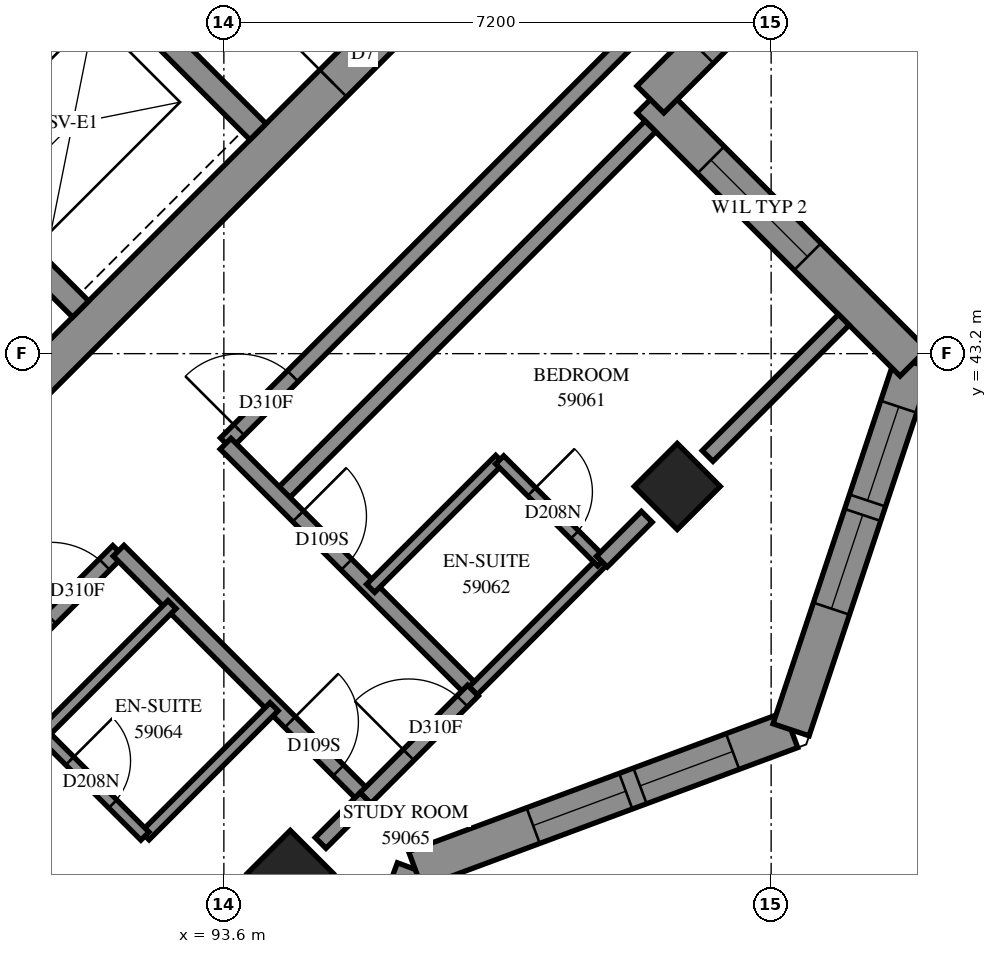
"""IFC4 building model, lengths in metres.
Left out: names, types, materials, properties, quantities, classifications, styles, units other than length and angle.
Written with IfcOpenShell. Run it as: python <this file> out.ifc"""

import sys

from ifc_helpers import new_model, si_unit, direction, frame, frame_2d, origin, origin_2d, place, context, subcontext, project, spatial, polyline, rectangle, outline, extrude, element, fill, save


model = new_model("IFC4")
c1 = context("Model", 3, precision=1e-05, world=origin(), true_north=direction((0.0, 1.0)))
c2 = subcontext(c1, "Body", "Model", "MODEL_VIEW")
j1 = project(units=[si_unit("LENGTHUNIT", "METRE"), si_unit("PLANEANGLEUNIT", "RADIAN")], contexts=[c1])
p1 = place(None, origin())
s1 = spatial("IfcSite", under=j1, at=p1, CompositionType="ELEMENT")
p2 = place(p1, origin())
s2 = spatial("IfcBuilding", under=s1, at=p2, CompositionType="ELEMENT")
p3 = place(p2, frame((0.0, 0.0, 216.8)))
s3 = spatial("IfcBuildingStorey", under=s2, at=p3, CompositionType="ELEMENT", Elevation=216.8)
for number, where, z_axis, x_axis in (
    (1, (99.565, 41.453, 0.0), (0.0, 0.0, 1.0), (0.707, -0.707, 0.0)),
    (2, (94.474, 36.362, 0.0), (0.0, 0.0, 1.0), (0.707, -0.707, 0.0)),
):
    element("IfcColumn", number, at=place(p3, frame(where, z_axis=z_axis, x_axis=x_axis)), inside=s3, PredefinedType="COLUMN", context=c2, shape_type="SweptSolid", body=[
        extrude(rectangle(XDim=0.8, YDim=0.8, at=origin_2d()), origin(), (0.0, 0.0, 1.0), 3.1),
    ])
p4 = place(p3, frame((87.013, 38.731, -0.3), z_axis=(0.0, 0.0, 1.0), x_axis=(0.7071067812, 0.7071067812, 0.0)))
e3 = element("IfcWall", 3, at=p4, inside=s3, PredefinedType="SHEAR", context=c2, shape_type="SweptSolid", body=[
    extrude(rectangle(XDim=14.4, YDim=0.5, at=frame_2d((7.2, 0.0))), origin(), (0.0, 0.0, 1.0), 2.7),
])
p5 = place(p4, frame((4.55, 0.0, 0.3)))
e4 = element("IfcOpeningElement", 4, at=p5, cuts=e3, PredefinedType="OPENING", context=c2, shape_type="SweptSolid", body=[
    extrude(rectangle(XDim=1.1, YDim=2.1, at=frame_2d((0.55, 1.05))), frame((0.0, 0.26, 0.0), z_axis=(0.0, -1.0, 0.0), x_axis=(1.0, 0.0, 0.0)), (0.0, 0.0, 1.0), 0.52),
])
p6 = place(p4, frame((11.35, 0.0, 0.3)))
e5 = element("IfcOpeningElement", 5, at=p6, cuts=e3, PredefinedType="OPENING", context=c2, shape_type="SweptSolid", body=[
    extrude(rectangle(XDim=1.1, YDim=2.1, at=frame_2d((0.55, 1.05))), frame((0.0, 0.26, 0.0), z_axis=(0.0, -1.0, 0.0), x_axis=(1.0, 0.0, 0.0)), (0.0, 0.0, 1.0), 0.52),
])
p7 = place(p3, frame((89.17, 46.332, 0.0), z_axis=(0.0, 0.0, 1.0), x_axis=(0.7071067812, 0.7071067812, 0.0)))
e6 = element("IfcWall", 6, at=p7, inside=s3, PredefinedType="SOLIDWALL", context=c2, shape_type="SweptSolid", body=[
    extrude(rectangle(XDim=3.3, YDim=0.3, at=frame_2d((1.65, 0.0))), origin(), (0.0, 0.0, 1.0), 3.1),
])
p8 = place(p3, frame((81.534, 53.969, 0.0), z_axis=(0.0, 0.0, 1.0), x_axis=(0.707103309, -0.7071102534, 0.0)))
e7 = element("IfcWall", 7, at=p8, inside=s3, PredefinedType="SOLIDWALL", context=c2, shape_type="SweptSolid", body=[
    extrude(rectangle(XDim=14.4, YDim=0.3, at=frame_2d((7.2, 0.0))), origin(), (0.0, 0.0, 1.0), 3.1),
])
p9 = place(p8, frame((1.25, 0.0, 0.0)))
e8 = element("IfcOpeningElement", 8, at=p9, cuts=e7, PredefinedType="OPENING", context=c2, shape_type="SweptSolid", body=[
    extrude(rectangle(XDim=1.1, YDim=2.1, at=frame_2d((0.55, 1.05))), frame((0.0, 0.16, 0.0), z_axis=(0.0, -1.0, 0.0), x_axis=(1.0, 0.0, 0.0)), (0.0, 0.0, 1.0), 0.32),
])
p10 = place(p8, frame((4.85, 0.0, 0.0)))
e9 = element("IfcOpeningElement", 9, at=p10, cuts=e7, PredefinedType="OPENING", context=c2, shape_type="SweptSolid", body=[
    extrude(rectangle(XDim=1.1, YDim=2.1, at=frame_2d((0.55, 1.05))), frame((0.0, 0.16, 0.0), z_axis=(0.0, -1.0, 0.0), x_axis=(1.0, 0.0, 0.0)), (0.0, 0.0, 1.0), 0.32),
])
p11 = place(p8, frame((8.45, 0.0, 0.0)))
e10 = element("IfcOpeningElement", 10, at=p11, cuts=e7, PredefinedType="OPENING", context=c2, shape_type="SweptSolid", body=[
    extrude(rectangle(XDim=1.1, YDim=2.1, at=frame_2d((0.55, 1.05))), frame((0.0, 0.16, 0.0), z_axis=(0.0, -1.0, 0.0), x_axis=(1.0, 0.0, 0.0)), (0.0, 0.0, 1.0), 0.32),
])
p12 = place(p8, frame((12.05, 0.0, 0.0)))
e11 = element("IfcOpeningElement", 11, at=p12, cuts=e7, PredefinedType="OPENING", context=c2, shape_type="SweptSolid", body=[
    extrude(rectangle(XDim=1.1, YDim=2.1, at=frame_2d((0.55, 1.05))), frame((0.0, 0.16, 0.0), z_axis=(0.0, -1.0, 0.0), x_axis=(1.0, 0.0, 0.0)), (0.0, 0.0, 1.0), 0.32),
])
p13 = place(p3, frame((88.958, 51.211, 0.0), z_axis=(0.0, 0.0, 1.0), x_axis=(0.7070998367, -0.7071137256, 0.0)))
e12 = element("IfcWall", 12, at=p13, inside=s3, PredefinedType="SOLIDWALL", context=c2, shape_type="SweptSolid", body=[
    extrude(rectangle(XDim=7.2, YDim=0.3, at=frame_2d((3.6, 0.0))), origin(), (0.0, 0.0, 1.0), 3.1),
])
p14 = place(p3, frame((94.281, 31.47, 0.0), z_axis=(0.0, 0.0, 1.0), x_axis=(0.3481903374, 0.9374238577, 0.0)))
e13 = element("IfcWall", 13, at=p14, inside=s3, PredefinedType="SOLIDWALL", context=c2, shape_type="SweptSolid", body=[
    extrude(outline(polyline([(-0.12, -0.25), (5.16, -0.25), (5.39, 0.25), (0.12, 0.25), (-0.12, -0.25)])), origin(), (0.0, 0.0, 1.0), 3.1),
])
p15 = place(p14, frame((1.512, 0.0, 0.45)))
e14 = element("IfcOpeningElement", 14, at=p15, cuts=e13, PredefinedType="OPENING", context=c2, shape_type="SweptSolid", body=[
    extrude(rectangle(XDim=1.3, YDim=2.5, at=frame_2d((0.65, 1.25))), frame((0.0, 0.26, 0.0), z_axis=(0.0, -1.0, 0.0), x_axis=(1.0, 0.0, 0.0)), (0.0, 0.0, 1.0), 0.52),
])
p16 = place(p14, frame((3.012, 0.0, 0.45)))
e15 = element("IfcOpeningElement", 15, at=p16, cuts=e13, PredefinedType="OPENING", context=c2, shape_type="SweptSolid", body=[
    extrude(rectangle(XDim=1.3, YDim=2.5, at=frame_2d((0.65, 1.25))), frame((0.0, 0.26, 0.0), z_axis=(0.0, -1.0, 0.0), x_axis=(1.0, 0.0, 0.0)), (0.0, 0.0, 1.0), 0.52),
])
p17 = place(p3, frame((96.118, 36.415, 0.0), z_axis=(0.0, 0.0, 1.0), x_axis=(0.9374238577, 0.3481903374, 0.0)))
e16 = element("IfcWall", 16, at=p17, inside=s3, PredefinedType="SOLIDWALL", context=c2, shape_type="SweptSolid", body=[
    extrude(outline(polyline([(0.115, -0.25), (5.395, -0.25), (5.155, 0.25), (-0.115, 0.25), (0.115, -0.25)])), origin(), (0.0, 0.0, 1.0), 3.1),
])
p18 = place(p17, frame((1.655, 0.0, 0.45)))
e17 = element("IfcOpeningElement", 17, at=p18, cuts=e16, PredefinedType="OPENING", context=c2, shape_type="SweptSolid", body=[
    extrude(rectangle(XDim=1.3, YDim=2.5, at=frame_2d((0.65, 1.25))), frame((0.0, 0.26, 0.0), z_axis=(0.0, -1.0, 0.0), x_axis=(1.0, 0.0, 0.0)), (0.0, 0.0, 1.0), 0.52),
])
p19 = place(p17, frame((3.155, 0.0, 0.45)))
e18 = element("IfcOpeningElement", 18, at=p19, cuts=e16, PredefinedType="OPENING", context=c2, shape_type="SweptSolid", body=[
    extrude(rectangle(XDim=1.3, YDim=2.5, at=frame_2d((0.65, 1.25))), frame((0.0, 0.26, 0.0), z_axis=(0.0, -1.0, 0.0), x_axis=(1.0, 0.0, 0.0)), (0.0, 0.0, 1.0), 0.52),
])
p20 = place(p3, frame((101.062, 38.252, 0.0), z_axis=(0.0, 0.0, 1.0), x_axis=(0.3162395484, 0.9486793705, 0.0)))
e19 = element("IfcWall", 19, at=p20, inside=s3, PredefinedType="SOLIDWALL", context=c2, shape_type="SweptSolid", body=[
    extrude(outline(polyline([(-0.12, -0.25), (5.247, -0.25), (4.938, 0.25), (0.12, 0.25), (-0.12, -0.25)])), origin(), (0.0, 0.0, 1.0), 3.1),
])
p21 = place(p20, frame((1.68, 0.0, 0.45)))
e20 = element("IfcOpeningElement", 20, at=p21, cuts=e19, PredefinedType="OPENING", context=c2, shape_type="SweptSolid", body=[
    extrude(rectangle(XDim=1.3, YDim=2.5, at=frame_2d((0.65, 1.25))), frame((0.0, 0.26, 0.0), z_axis=(0.0, -1.0, 0.0), x_axis=(1.0, 0.0, 0.0)), (0.0, 0.0, 1.0), 0.52),
])
p22 = place(p20, frame((3.18, 0.0, 0.45)))
e21 = element("IfcOpeningElement", 21, at=p22, cuts=e19, PredefinedType="OPENING", context=c2, shape_type="SweptSolid", body=[
    extrude(rectangle(XDim=1.3, YDim=2.5, at=frame_2d((0.65, 1.25))), frame((0.0, 0.26, 0.0), z_axis=(0.0, -1.0, 0.0), x_axis=(1.0, 0.0, 0.0)), (0.0, 0.0, 1.0), 0.52),
])
p23 = place(p3, frame((102.673, 43.083, 0.0), z_axis=(0.0, 0.0, 1.0), x_axis=(-0.7071067812, 0.7071067812, 0.0)))
e22 = element("IfcWall", 22, at=p23, inside=s3, PredefinedType="SOLIDWALL", context=c2, shape_type="SweptSolid", body=[
    extrude(outline(polyline([(-0.154, -0.25), (4.646, -0.25), (5.146, 0.25), (0.154, 0.25), (-0.154, -0.25)])), origin(), (0.0, 0.0, 1.0), 3.1),
])
p24 = place(p23, frame((1.97, 0.0, 0.6)))
e23 = element("IfcOpeningElement", 23, at=p24, cuts=e22, PredefinedType="OPENING", context=c2, shape_type="SweptSolid", body=[
    extrude(rectangle(XDim=1.8, YDim=1.9, at=frame_2d((0.9, 0.95))), frame((0.0, 0.26, 0.0), z_axis=(0.0, -1.0, 0.0), x_axis=(1.0, 0.0, 0.0)), (0.0, 0.0, 1.0), 0.52),
])
p25 = place(p3, frame((99.211, 46.544, 0.0), z_axis=(0.0, 0.0, 1.0), x_axis=(0.7071067812, 0.7071067812, 0.0)))
e24 = element("IfcWall", 24, at=p25, inside=s3, PredefinedType="SOLIDWALL", context=c2, shape_type="SweptSolid", body=[
    extrude(outline(polyline([(0.25, -0.25), (6.192, -0.25), (5.492, 0.25), (-0.25, 0.25), (0.25, -0.25)])), origin(), (0.0, 0.0, 1.0), 3.1),
])
p26 = place(p25, frame((0.925, 0.0, 0.6)))
e25 = element("IfcOpeningElement", 25, at=p26, cuts=e24, PredefinedType="OPENING", context=c2, shape_type="SweptSolid", body=[
    extrude(rectangle(XDim=1.8, YDim=1.9, at=frame_2d((0.9, 0.95))), frame((0.0, 0.26, 0.0), z_axis=(0.0, -1.0, 0.0), x_axis=(1.0, 0.0, 0.0)), (0.0, 0.0, 1.0), 0.52),
])
p27 = place(p25, frame((3.971, 0.0, 0.6)))
e26 = element("IfcOpeningElement", 26, at=p27, cuts=e24, PredefinedType="OPENING", context=c2, shape_type="SweptSolid", body=[
    extrude(rectangle(XDim=1.2, YDim=1.9, at=frame_2d((0.6, 0.95))), frame((0.0, 0.26, 0.0), z_axis=(0.0, -1.0, 0.0), x_axis=(1.0, 0.0, 0.0)), (0.0, 0.0, 1.0), 0.52),
])
p28 = place(p3, frame((93.625, 42.021, 0.0), z_axis=(0.0, 0.0, 1.0), x_axis=(0.7071067812, 0.7071067812, 0.0)))
e27 = element("IfcWall", 27, at=p28, inside=s3, PredefinedType="PARTITIONING", context=c2, shape_type="SweptSolid", body=[
    extrude(rectangle(XDim=9.998, YDim=0.2, at=frame_2d((4.999, 0.0))), origin(), (0.0, 0.0, 1.0), 3.1),
])
p29 = place(p28, frame((0.248, 0.0, 0.0)))
e28 = element("IfcOpeningElement", 28, at=p29, cuts=e27, PredefinedType="OPENING", context=c2, shape_type="SweptSolid", body=[
    extrude(rectangle(XDim=1.0, YDim=2.1, at=frame_2d((0.5, 1.05))), frame((0.0, 0.11, 0.0), z_axis=(0.0, -1.0, 0.0), x_axis=(1.0, 0.0, 0.0)), (0.0, 0.0, 1.0), 0.22),
])
p30 = place(p3, frame((86.835, 35.231, 0.0), z_axis=(0.0, 0.0, 1.0), x_axis=(0.7071067812, 0.7071067812, 0.0)))
e29 = element("IfcWall", 29, at=p30, inside=s3, PredefinedType="PARTITIONING", context=c2, shape_type="SweptSolid", body=[
    extrude(rectangle(XDim=7.6, YDim=0.2, at=frame_2d((3.8, 0.0))), origin(), (0.0, 0.0, 1.0), 3.1),
])
p31 = place(p30, frame((6.346, 0.0, 0.0)))
e30 = element("IfcOpeningElement", 30, at=p31, cuts=e29, PredefinedType="OPENING", context=c2, shape_type="SweptSolid", body=[
    extrude(rectangle(XDim=1.0, YDim=2.1, at=frame_2d((0.5, 1.05))), frame((0.0, 0.11, 0.0), z_axis=(0.0, -1.0, 0.0), x_axis=(1.0, 0.0, 0.0)), (0.0, 0.0, 1.0), 0.22),
])
p32 = place(p3, frame((94.331, 41.313, 0.0), z_axis=(0.0, 0.0, 1.0), x_axis=(0.7072516979, 0.7069618347, 0.0)))
e31 = element("IfcWall", 31, at=p32, inside=s3, PredefinedType="PARTITIONING", context=c2, shape_type="SweptSolid", body=[
    extrude(rectangle(XDim=6.9, YDim=0.2, at=frame_2d((3.45, 0.0))), origin(), (0.0, 0.0, 1.0), 3.1),
])
p33 = place(p3, frame((93.623, 42.015, 0.0), z_axis=(0.0, 0.0, 1.0), x_axis=(0.7071067812, -0.7071067812, 0.0)))
e32 = element("IfcWall", 32, at=p33, inside=s3, PredefinedType="PARTITIONING", context=c2, shape_type="SweptSolid", body=[
    extrude(rectangle(XDim=4.599, YDim=0.2, at=frame_2d((2.3, 0.0))), origin(), (0.0, 0.0, 1.0), 3.1),
])
p34 = place(p33, frame((1.349, 0.0, 0.0)))
e33 = element("IfcOpeningElement", 33, at=p34, cuts=e32, PredefinedType="OPENING", context=c2, shape_type="SweptSolid", body=[
    extrude(rectangle(XDim=0.9, YDim=2.1, at=frame_2d((0.45, 1.05))), frame((0.0, 0.11, 0.0), z_axis=(0.0, -1.0, 0.0), x_axis=(1.0, 0.0, 0.0)), (0.0, 0.0, 1.0), 0.22),
])
p35 = place(p3, frame((92.216, 40.608, 0.0), z_axis=(0.0, 0.0, 1.0), x_axis=(0.7071067812, -0.7071067812, 0.0)))
e34 = element("IfcWall", 34, at=p35, inside=s3, PredefinedType="PARTITIONING", context=c2, shape_type="SweptSolid", body=[
    extrude(rectangle(XDim=4.599, YDim=0.2, at=frame_2d((2.3, 0.0))), origin(), (0.0, 0.0, 1.0), 3.1),
])
p36 = place(p35, frame((3.189, 0.0, 0.0)))
e35 = element("IfcOpeningElement", 35, at=p36, cuts=e34, PredefinedType="OPENING", context=c2, shape_type="SweptSolid", body=[
    extrude(rectangle(XDim=0.9, YDim=2.1, at=frame_2d((0.45, 1.05))), frame((0.0, 0.11, 0.0), z_axis=(0.0, -1.0, 0.0), x_axis=(1.0, 0.0, 0.0)), (0.0, 0.0, 1.0), 0.22),
])
p37 = place(p3, frame((99.964, 41.854, 0.0), z_axis=(0.0, 0.0, 1.0), x_axis=(0.7071265121, 0.7070870497, 0.0)))
e36 = element("IfcWall", 36, at=p37, inside=s3, PredefinedType="PARTITIONING", context=c2, shape_type="SweptSolid", body=[
    extrude(rectangle(XDim=2.534, YDim=0.2, at=frame_2d((1.267, 0.0))), origin(), (0.0, 0.0, 1.0), 3.1),
])
for number, where, z_axis, x_axis in (
    (37, (92.563, 36.857, 0.0), (0.0, 0.0, 1.0), (0.707, 0.707, 0.0)),
    (38, (91.219, 38.201, 0.0), (0.0, 0.0, 1.0), (0.707, 0.707, 0.0)),
):
    element("IfcWall", number, at=place(p3, frame(where, z_axis=z_axis, x_axis=x_axis)), inside=s3, PredefinedType="PARTITIONING", context=c2, shape_type="SweptSolid", body=[
        extrude(rectangle(XDim=2.401, YDim=0.15, at=frame_2d((1.201, 0.0))), origin(), (0.0, 0.0, 1.0), 3.1),
    ])
p38 = place(p3, frame((96.879, 38.764, 0.0), z_axis=(0.0, 0.0, 1.0), x_axis=(0.706689978, 0.7075233388, 0.0)))
e39 = element("IfcWall", 39, at=p38, inside=s3, PredefinedType="PARTITIONING", context=c2, shape_type="SweptSolid", body=[
    extrude(rectangle(XDim=2.4, YDim=0.15, at=frame_2d((1.2, 0.0))), origin(), (0.0, 0.0, 1.0), 2.6),
])
p39 = place(p3, frame((95.531, 40.113, 0.0), z_axis=(0.0, 0.0, 1.0), x_axis=(0.7075233388, 0.706689978, 0.0)))
e40 = element("IfcWall", 40, at=p39, inside=s3, PredefinedType="PARTITIONING", context=c2, shape_type="SweptSolid", body=[
    extrude(rectangle(XDim=2.4, YDim=0.15, at=frame_2d((1.2, 0.0))), origin(), (0.0, 0.0, 1.0), 3.1),
])
p40 = place(p3, frame((95.463, 37.353, 0.0), z_axis=(0.0, 0.0, 1.0), x_axis=(0.7071067812, 0.7071067812, 0.0)))
e41 = element("IfcWall", 41, at=p40, inside=s3, PredefinedType="PARTITIONING", context=c2, shape_type="SweptSolid", body=[
    extrude(rectangle(XDim=2.0, YDim=0.2, at=frame_2d((1.0, 0.0))), origin(), (0.0, 0.0, 1.0), 2.6),
])
p41 = place(p40, frame((0.802, 0.0, 0.0)))
e42 = element("IfcOpeningElement", 42, at=p41, cuts=e41, PredefinedType="OPENING", context=c2, shape_type="SweptSolid", body=[
    extrude(rectangle(XDim=1.0, YDim=2.1, at=frame_2d((0.5, 1.05))), frame((0.0, 0.11, 0.0), z_axis=(0.0, -1.0, 0.0), x_axis=(1.0, 0.0, 0.0)), (0.0, 0.0, 1.0), 0.22),
])
p42 = place(p3, frame((91.217, 38.197, 0.0), z_axis=(0.0, 0.0, 1.0), x_axis=(0.7071067812, -0.7071067812, 0.0)))
e43 = element("IfcWall", 43, at=p42, inside=s3, PredefinedType="PARTITIONING", context=c2, shape_type="SweptSolid", body=[
    extrude(rectangle(XDim=1.901, YDim=0.15, at=frame_2d((0.95, 0.0))), origin(), (0.0, 0.0, 1.0), 3.1),
])
p43 = place(p42, frame((0.502, 0.0, 0.0)))
e44 = element("IfcOpeningElement", 44, at=p43, cuts=e43, PredefinedType="OPENING", context=c2, shape_type="SweptSolid", body=[
    extrude(rectangle(XDim=0.8, YDim=2.1, at=frame_2d((0.4, 1.05))), frame((0.0, 0.085, 0.0), z_axis=(0.0, -1.0, 0.0), x_axis=(1.0, 0.0, 0.0)), (0.0, 0.0, 1.0), 0.17),
])
p44 = place(p3, frame((97.229, 41.803, 0.0), z_axis=(0.0, 0.0, 1.0), x_axis=(0.7071067812, -0.7071067812, 0.0)))
e45 = element("IfcWall", 45, at=p44, inside=s3, PredefinedType="PARTITIONING", context=c2, shape_type="SweptSolid", body=[
    extrude(rectangle(XDim=1.898, YDim=0.15, at=frame_2d((0.949, 0.0))), origin(), (0.0, 0.0, 1.0), 3.1),
])
p45 = place(p44, frame((0.594, 0.0, 0.0)))
e46 = element("IfcOpeningElement", 46, at=p45, cuts=e45, PredefinedType="OPENING", context=c2, shape_type="SweptSolid", body=[
    extrude(rectangle(XDim=0.8, YDim=2.1, at=frame_2d((0.4, 1.05))), frame((0.0, 0.085, 0.0), z_axis=(0.0, -1.0, 0.0), x_axis=(1.0, 0.0, 0.0)), (0.0, 0.0, 1.0), 0.17),
])
for number, where, z_axis, x_axis in (
    (47, (98.574, 40.464, 0.0), (0.0, 0.0, 1.0), (0.707, 0.707, 0.0)),
    (48, (94.873, 36.763, 0.0), (0.0, 0.0, 1.0), (0.707, 0.707, 0.0)),
):
    element("IfcWall", number, at=place(p3, frame(where, z_axis=z_axis, x_axis=x_axis)), inside=s3, PredefinedType="PARTITIONING", context=c2, shape_type="SweptSolid", body=[
        extrude(rectangle(XDim=0.834, YDim=0.2, at=frame_2d((0.417, 0.0))), origin(), (0.0, 0.0, 1.0), 2.6),
    ])
p46 = place(p18, origin())
e49 = element("IfcWindow", 49, at=p46, inside=s3, PartitioningType="SINGLE_PANEL", PredefinedType="WINDOW", context=c2, shape_type="SweptSolid", body=[
    extrude(rectangle(XDim=1.3, YDim=2.5, at=frame_2d((0.65, 1.25))), frame((0.0, 0.18, 0.0), z_axis=(0.0, -1.0, 0.0), x_axis=(1.0, 0.0, 0.0)), (0.0, 0.0, 1.0), 0.06),
])
fill(e17, e49)
p47 = place(p19, origin())
e50 = element("IfcWindow", 50, at=p47, inside=s3, PartitioningType="SINGLE_PANEL", PredefinedType="WINDOW", context=c2, shape_type="SweptSolid", body=[
    extrude(rectangle(XDim=1.3, YDim=2.5, at=frame_2d((0.65, 1.25))), frame((0.0, 0.18, 0.0), z_axis=(0.0, -1.0, 0.0), x_axis=(1.0, 0.0, 0.0)), (0.0, 0.0, 1.0), 0.06),
])
fill(e18, e50)
p48 = place(p21, origin())
e51 = element("IfcWindow", 51, at=p48, inside=s3, PartitioningType="SINGLE_PANEL", PredefinedType="WINDOW", context=c2, shape_type="SweptSolid", body=[
    extrude(rectangle(XDim=1.3, YDim=2.5, at=frame_2d((0.65, 1.25))), frame((0.0, 0.18, 0.0), z_axis=(0.0, -1.0, 0.0), x_axis=(1.0, 0.0, 0.0)), (0.0, 0.0, 1.0), 0.06),
])
fill(e20, e51)
p49 = place(p22, origin())
e52 = element("IfcWindow", 52, at=p49, inside=s3, PartitioningType="SINGLE_PANEL", PredefinedType="WINDOW", context=c2, shape_type="SweptSolid", body=[
    extrude(rectangle(XDim=1.3, YDim=2.5, at=frame_2d((0.65, 1.25))), frame((0.0, 0.18, 0.0), z_axis=(0.0, -1.0, 0.0), x_axis=(1.0, 0.0, 0.0)), (0.0, 0.0, 1.0), 0.06),
])
fill(e21, e52)
p50 = place(p24, origin())
e53 = element("IfcWindow", 53, at=p50, inside=s3, PartitioningType="SINGLE_PANEL", PredefinedType="WINDOW", context=c2, shape_type="SweptSolid", body=[
    extrude(rectangle(XDim=1.8, YDim=1.9, at=frame_2d((0.9, 0.95))), frame((0.0, 0.18, 0.0), z_axis=(0.0, -1.0, 0.0), x_axis=(1.0, 0.0, 0.0)), (0.0, 0.0, 1.0), 0.06),
])
fill(e23, e53)
p51 = place(p6, origin())
e54 = element("IfcDoor", 54, at=p51, inside=s3, OperationType="SINGLE_SWING_RIGHT", PredefinedType="DOOR", context=c2, shape_type="SweptSolid", body=[
    extrude(rectangle(XDim=1.1, YDim=2.1, at=frame_2d((0.55, 1.05))), frame((0.0, 0.025, 0.0), z_axis=(0.0, -1.0, 0.0), x_axis=(1.0, 0.0, 0.0)), (0.0, 0.0, 1.0), 0.05),
])
fill(e5, e54)
p52 = place(p29, origin())
e55 = element("IfcDoor", 55, at=p52, inside=s3, OperationType="SINGLE_SWING_LEFT", PredefinedType="DOOR", context=c2, shape_type="SweptSolid", body=[
    extrude(rectangle(XDim=1.0, YDim=2.1, at=frame_2d((0.5, 1.05))), frame((0.0, 0.025, 0.0), z_axis=(0.0, -1.0, 0.0), x_axis=(1.0, 0.0, 0.0)), (0.0, 0.0, 1.0), 0.05),
])
fill(e28, e55)
p53 = place(p31, origin())
e56 = element("IfcDoor", 56, at=p53, inside=s3, OperationType="SINGLE_SWING_RIGHT", PredefinedType="DOOR", context=c2, shape_type="SweptSolid", body=[
    extrude(rectangle(XDim=1.0, YDim=2.1, at=frame_2d((0.5, 1.05))), frame((0.0, 0.025, 0.0), z_axis=(0.0, -1.0, 0.0), x_axis=(1.0, 0.0, 0.0)), (0.0, 0.0, 1.0), 0.05),
])
fill(e30, e56)
p54 = place(p34, origin())
e57 = element("IfcDoor", 57, at=p54, inside=s3, OperationType="SINGLE_SWING_RIGHT", PredefinedType="DOOR", context=c2, shape_type="SweptSolid", body=[
    extrude(rectangle(XDim=0.9, YDim=2.1, at=frame_2d((0.45, 1.05))), frame((0.0, 0.025, 0.0), z_axis=(0.0, -1.0, 0.0), x_axis=(1.0, 0.0, 0.0)), (0.0, 0.0, 1.0), 0.05),
])
fill(e33, e57)
p55 = place(p45, origin())
e58 = element("IfcDoor", 58, at=p55, inside=s3, OperationType="SINGLE_SWING_RIGHT", PredefinedType="DOOR", context=c2, shape_type="SweptSolid", body=[
    extrude(rectangle(XDim=0.8, YDim=2.1, at=frame_2d((0.4, 1.05))), frame((0.0, 0.025, 0.0), z_axis=(0.0, -1.0, 0.0), x_axis=(1.0, 0.0, 0.0)), (0.0, 0.0, 1.0), 0.05),
])
fill(e46, e58)
p56 = place(p36, origin())
e59 = element("IfcDoor", 59, at=p56, inside=s3, OperationType="SINGLE_SWING_LEFT", PredefinedType="DOOR", context=c2, shape_type="SweptSolid", body=[
    extrude(rectangle(XDim=0.9, YDim=2.1, at=frame_2d((0.45, 1.05))), frame((0.0, 0.025, 0.0), z_axis=(0.0, -1.0, 0.0), x_axis=(1.0, 0.0, 0.0)), (0.0, 0.0, 1.0), 0.05),
])
fill(e35, e59)
p57 = place(p43, origin())
e60 = element("IfcDoor", 60, at=p57, inside=s3, OperationType="SINGLE_SWING_RIGHT", PredefinedType="DOOR", context=c2, shape_type="SweptSolid", body=[
    extrude(rectangle(XDim=0.8, YDim=2.1, at=frame_2d((0.4, 1.05))), frame((0.0, 0.025, 0.0), z_axis=(0.0, -1.0, 0.0), x_axis=(1.0, 0.0, 0.0)), (0.0, 0.0, 1.0), 0.05),
])
fill(e44, e60)
p58 = place(p41, origin())
e61 = element("IfcDoor", 61, at=p58, inside=s3, OperationType="SINGLE_SWING_RIGHT", PredefinedType="DOOR", context=c2, shape_type="SweptSolid", body=[
    extrude(rectangle(XDim=1.0, YDim=2.1, at=frame_2d((0.5, 1.05))), frame((0.0, 0.025, 0.0), z_axis=(0.0, -1.0, 0.0), x_axis=(1.0, 0.0, 0.0)), (0.0, 0.0, 1.0), 0.05),
])
fill(e42, e61)
save(model, sys.argv[1])
